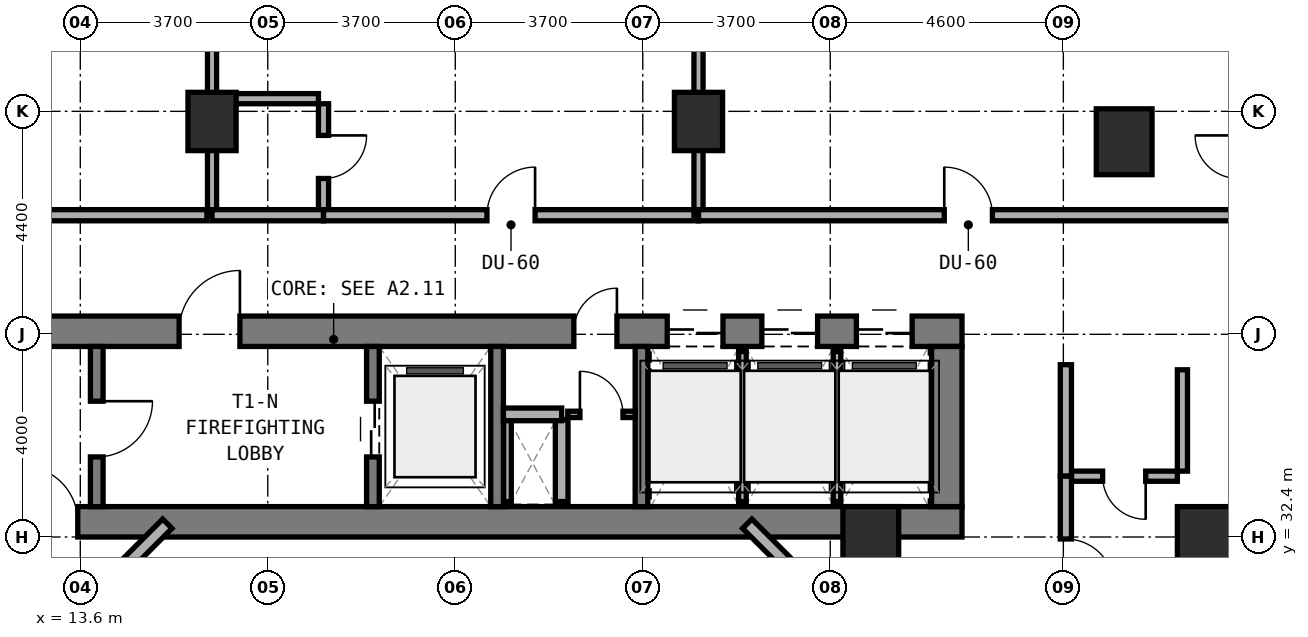
"""IFC4 building model, lengths in metres.
Left out: names, types, materials, properties, quantities, classifications, styles, units other than length and angle.
Written with IfcOpenShell. Run it as: python <this file> out.ifc"""

import sys

from ifc_helpers import new_model, si_unit, direction, frame, frame_2d, origin, origin_2d, place, context, subcontext, project, spatial, rectangle, extrude, element, fill, save


model = new_model("IFC4")
c1 = context("Model", 3, precision=1e-05, world=origin(), true_north=direction((0.0, 1.0)))
c2 = subcontext(c1, "Body", "Model", "MODEL_VIEW")
j1 = project(units=[si_unit("LENGTHUNIT", "METRE"), si_unit("PLANEANGLEUNIT", "RADIAN")], contexts=[c1])
p1 = place(None, origin())
s1 = spatial("IfcSite", under=j1, at=p1, CompositionType="ELEMENT")
p2 = place(p1, origin())
s2 = spatial("IfcBuilding", under=s1, at=p2, CompositionType="ELEMENT")
p3 = place(p2, frame((0.0, 0.0, 38.0)))
s3 = spatial("IfcBuildingStorey", under=s2, at=p3, CompositionType="ELEMENT", Elevation=38.0)
p4 = place(p3, frame((6.2, 32.7, 0.0), z_axis=(0.0, 0.0, 1.0), x_axis=(1.0, 0.0, 0.0)))
e1 = element("IfcWall", 1, at=p4, inside=s3, PredefinedType="SHEAR", context=c2, shape_type="SweptSolid", body=[
    extrude(rectangle(XDim=24.8, YDim=0.6, at=frame_2d((12.4, 0.0))), origin(), (0.0, 0.0, 1.0), 3.5),
])
p5 = place(p4, frame((6.25, 0.0, 0.0)))
e2 = element("IfcOpeningElement", 2, at=p5, cuts=e1, PredefinedType="OPENING", context=c2, shape_type="SweptSolid", body=[
    extrude(rectangle(XDim=1.1, YDim=2.15, at=frame_2d((0.55, 1.075))), frame((0.0, 0.31, 0.0), z_axis=(0.0, -1.0, 0.0), x_axis=(1.0, 0.0, 0.0)), (0.0, 0.0, 1.0), 0.62),
])
p6 = place(p3, frame((6.2, 36.46, 0.0), z_axis=(0.0, 0.0, 1.0), x_axis=(1.0, 0.0, 0.0)))
e3 = element("IfcWall", 3, at=p6, inside=s3, PredefinedType="SHEAR", context=c2, shape_type="SweptSolid", body=[
    extrude(rectangle(XDim=24.8, YDim=0.6, at=frame_2d((12.4, 0.0))), origin(), (0.0, 0.0, 1.0), 3.5),
])
p7 = place(p6, frame((9.35, 0.0, 0.0)))
e4 = element("IfcOpeningElement", 4, at=p7, cuts=e3, PredefinedType="OPENING", context=c2, shape_type="SweptSolid", body=[
    extrude(rectangle(XDim=1.2, YDim=2.15, at=frame_2d((0.6, 1.075))), frame((0.0, 0.31, 0.0), z_axis=(0.0, -1.0, 0.0), x_axis=(1.0, 0.0, 0.0)), (0.0, 0.0, 1.0), 0.62),
])
p8 = place(p6, frame((17.14, 0.0, 0.0)))
e5 = element("IfcOpeningElement", 5, at=p8, cuts=e3, PredefinedType="OPENING", context=c2, shape_type="SweptSolid", body=[
    extrude(rectangle(XDim=0.85, YDim=2.1, at=frame_2d((0.425, 1.05))), frame((0.0, 0.31, 0.0), z_axis=(0.0, -1.0, 0.0), x_axis=(1.0, 0.0, 0.0)), (0.0, 0.0, 1.0), 0.62),
])
p9 = place(p6, frame((18.983, 0.0, 0.0)))
e6 = element("IfcOpeningElement", 6, at=p9, cuts=e3, PredefinedType="OPENING", context=c2, shape_type="SweptSolid", body=[
    extrude(rectangle(XDim=1.1, YDim=2.15, at=frame_2d((0.55, 1.075))), frame((0.0, 0.31, 0.0), z_axis=(0.0, -1.0, 0.0), x_axis=(1.0, 0.0, 0.0)), (0.0, 0.0, 1.0), 0.62),
])
p10 = place(p6, frame((20.85, 0.0, 0.0)))
e7 = element("IfcOpeningElement", 7, at=p10, cuts=e3, PredefinedType="OPENING", context=c2, shape_type="SweptSolid", body=[
    extrude(rectangle(XDim=1.1, YDim=2.15, at=frame_2d((0.55, 1.075))), frame((0.0, 0.31, 0.0), z_axis=(0.0, -1.0, 0.0), x_axis=(1.0, 0.0, 0.0)), (0.0, 0.0, 1.0), 0.62),
])
p11 = place(p6, frame((22.716, 0.0, 0.0)))
e8 = element("IfcOpeningElement", 8, at=p11, cuts=e3, PredefinedType="OPENING", context=c2, shape_type="SweptSolid", body=[
    extrude(rectangle(XDim=1.1, YDim=2.15, at=frame_2d((0.55, 1.075))), frame((0.0, 0.31, 0.0), z_axis=(0.0, -1.0, 0.0), x_axis=(1.0, 0.0, 0.0)), (0.0, 0.0, 1.0), 0.62),
])
p12 = place(p3, frame((30.7, 33.0, 0.0), z_axis=(0.0, 0.0, 1.0), x_axis=(0.0, 1.0, 0.0)))
e9 = element("IfcWall", 9, at=p12, inside=s3, PredefinedType="SHEAR", context=c2, shape_type="SweptSolid", body=[
    extrude(rectangle(XDim=3.16, YDim=0.6, at=frame_2d((1.58, 0.0))), origin(), (0.0, 0.0, 1.0), 3.5),
])
p13 = place(p3, frame((13.925, 33.0, 0.0), z_axis=(0.0, 0.0, 1.0), x_axis=(0.0, 1.0, 0.0)))
e10 = element("IfcWall", 10, at=p13, inside=s3, PredefinedType="STANDARD", context=c2, shape_type="SweptSolid", body=[
    extrude(rectangle(XDim=3.16, YDim=0.25, at=frame_2d((1.58, 0.0))), origin(), (0.0, 0.0, 1.0), 3.22),
])
p14 = place(p13, frame((0.98, 0.0, 0.0)))
e11 = element("IfcOpeningElement", 11, at=p14, cuts=e10, PredefinedType="OPENING", context=c2, shape_type="SweptSolid", body=[
    extrude(rectangle(XDim=1.1, YDim=2.15, at=frame_2d((0.55, 1.075))), frame((0.0, 0.135, 0.0), z_axis=(0.0, -1.0, 0.0), x_axis=(1.0, 0.0, 0.0)), (0.0, 0.0, 1.0), 0.27),
])
p15 = place(p3, frame((19.375, 33.0, 0.0), z_axis=(0.0, 0.0, 1.0), x_axis=(0.0, 1.0, 0.0)))
e12 = element("IfcWall", 12, at=p15, inside=s3, PredefinedType="STANDARD", context=c2, shape_type="SweptSolid", body=[
    extrude(rectangle(XDim=3.16, YDim=0.25, at=frame_2d((1.58, 0.0))), origin(), (0.0, 0.0, 1.0), 3.22),
])
p16 = place(p15, frame((0.98, 0.0, 0.0)))
e13 = element("IfcOpeningElement", 13, at=p16, cuts=e12, PredefinedType="OPENING", context=c2, shape_type="SweptSolid", body=[
    extrude(rectangle(XDim=1.1, YDim=2.15, at=frame_2d((0.55, 1.075))), frame((0.0, 0.135, 0.0), z_axis=(0.0, -1.0, 0.0), x_axis=(1.0, 0.0, 0.0)), (0.0, 0.0, 1.0), 0.27),
])
for number, where, z_axis, x_axis in (
    (14, (21.825, 33.0, 0.0), (0.0, 0.0, 1.0), (0.0, 1.0, 0.0)),
    (15, (24.675, 33.0, 0.0), (0.0, 0.0, 1.0), (0.0, 1.0, 0.0)),
):
    element("IfcWall", number, at=place(p3, frame(where, z_axis=z_axis, x_axis=x_axis)), inside=s3, PredefinedType="STANDARD", context=c2, shape_type="SweptSolid", body=[
        extrude(rectangle(XDim=3.16, YDim=0.25, at=frame_2d((1.58, 0.0))), origin(), (0.0, 0.0, 1.0), 3.22),
    ])
for number, where, z_axis, x_axis in (
    (16, (16.2, 40.6, 0.0), (0.0, 0.0, 1.0), (1.0, 0.0, 0.0)),
    (17, (25.8, 40.6, 0.0), (0.0, 0.0, 1.0), (1.0, 0.0, 0.0)),
):
    element("IfcColumn", number, at=place(p3, frame(where, z_axis=z_axis, x_axis=x_axis)), inside=s3, PredefinedType="COLUMN", context=c2, shape_type="SweptSolid", body=[
        extrude(rectangle(XDim=0.95, YDim=1.15, at=origin_2d()), origin(), (0.0, 0.0, 1.0), 3.5),
    ])
for number, where, z_axis, x_axis in (
    (18, (34.2, 40.2, 0.0), (0.0, 0.0, 1.0), (1.0, 0.0, 0.0)),
    (19, (35.8, 32.35, 0.0), (0.0, 0.0, 1.0), (1.0, 0.0, 0.0)),
    (20, (29.2, 32.35, 0.0), (0.0, 0.0, 1.0), (1.0, 0.0, 0.0)),
):
    element("IfcColumn", number, at=place(p3, frame(where, z_axis=z_axis, x_axis=x_axis)), inside=s3, PredefinedType="COLUMN", context=c2, shape_type="SweptSolid", body=[
        extrude(rectangle(XDim=1.1, YDim=1.3, at=origin_2d()), origin(), (0.0, 0.0, 1.0), 3.5),
    ])
p17 = place(p3, frame((28.596, 30.828, 0.0), z_axis=(0.0, 0.0, 1.0), x_axis=(-0.707059717605, 0.707153841636, 0.0)))
e21 = element("IfcWall", 21, at=p17, inside=s3, PredefinedType="STANDARD", context=c2, shape_type="SweptSolid", body=[
    extrude(rectangle(XDim=2.594, YDim=0.26, at=frame_2d((1.297, 0.0))), origin(), (0.0, 0.0, 1.0), 3.22),
])
p18 = place(p3, frame((15.318, 32.662, 0.0), z_axis=(0.0, 0.0, 1.0), x_axis=(-0.707106781187, -0.707106781187, 0.0)))
e22 = element("IfcWall", 22, at=p18, inside=s3, PredefinedType="STANDARD", context=c2, shape_type="SweptSolid", body=[
    extrude(rectangle(XDim=2.594, YDim=0.26, at=frame_2d((1.297, 0.0))), origin(), (0.0, 0.0, 1.0), 3.22),
])
p19 = place(p3, frame((22.03, 33.1, 0.0), z_axis=(0.0, 0.0, 1.0), x_axis=(0.0, 1.0, 0.0)))
e23 = element("IfcWall", 23, at=p19, inside=s3, PredefinedType="PARTITIONING", context=c2, shape_type="SweptSolid", body=[
    extrude(rectangle(XDim=1.62, YDim=0.15, at=frame_2d((0.81, 0.0))), origin(), (0.0, 0.0, 1.0), 3.22),
])
p20 = place(p3, frame((23.1, 33.1, 0.0), z_axis=(0.0, 0.0, 1.0), x_axis=(0.0, 1.0, 0.0)))
e24 = element("IfcWall", 24, at=p20, inside=s3, PredefinedType="SOLIDWALL", context=c2, shape_type="SweptSolid", body=[
    extrude(rectangle(XDim=1.62, YDim=0.25, at=frame_2d((0.81, 0.0))), origin(), (0.0, 0.0, 1.0), 3.22),
])
p21 = place(p3, frame((21.95, 34.82, 0.0), z_axis=(0.0, 0.0, 1.0), x_axis=(1.0, 0.0, 0.0)))
e25 = element("IfcWall", 25, at=p21, inside=s3, PredefinedType="SOLIDWALL", context=c2, shape_type="SweptSolid", body=[
    extrude(rectangle(XDim=1.15, YDim=0.25, at=frame_2d((0.575, 0.0))), origin(), (0.0, 0.0, 1.0), 3.22),
])
p22 = place(p3, frame((23.22, 34.82, 0.0), z_axis=(0.0, 0.0, 1.0), x_axis=(1.0, 0.0, 0.0)))
e26 = element("IfcWall", 26, at=p22, inside=s3, PredefinedType="PARTITIONING", context=c2, shape_type="SweptSolid", body=[
    extrude(rectangle(XDim=1.33, YDim=0.125, at=frame_2d((0.665, 0.0))), origin(), (0.0, 0.0, 1.0), 3.22),
])
p23 = place(p22, frame((0.24, 0.0, 0.0)))
e27 = element("IfcOpeningElement", 27, at=p23, cuts=e26, PredefinedType="OPENING", context=c2, shape_type="SweptSolid", body=[
    extrude(rectangle(XDim=0.85, YDim=2.1, at=frame_2d((0.425, 1.05))), frame((0.0, 0.073, 0.0), z_axis=(0.0, -1.0, 0.0), x_axis=(1.0, 0.0, 0.0)), (0.0, 0.0, 1.0), 0.145),
])
p24 = place(p3, frame((26.667, 33.1, 0.0), z_axis=(0.0, 0.0, 1.0), x_axis=(0.0, 1.0, 0.0)))
e28 = element("IfcWall", 28, at=p24, inside=s3, PredefinedType="PARTITIONING", context=c2, shape_type="SweptSolid", body=[
    extrude(rectangle(XDim=2.96, YDim=0.15, at=frame_2d((1.48, 0.0))), origin(), (0.0, 0.0, 1.0), 3.22),
])
p25 = place(p3, frame((28.533, 33.1, 0.0), z_axis=(0.0, 0.0, 1.0), x_axis=(0.0, 1.0, 0.0)))
e29 = element("IfcWall", 29, at=p25, inside=s3, PredefinedType="PARTITIONING", context=c2, shape_type="SweptSolid", body=[
    extrude(rectangle(XDim=2.96, YDim=0.15, at=frame_2d((1.48, 0.0))), origin(), (0.0, 0.0, 1.0), 2.395),
])
p26 = place(p3, frame((7.9, 38.75, 0.0), z_axis=(0.0, 0.0, 1.0), x_axis=(1.0, 0.0, 0.0)))
e30 = element("IfcWall", 30, at=p26, inside=s3, PredefinedType="SOLIDWALL", context=c2, shape_type="SweptSolid", body=[
    extrude(rectangle(XDim=8.2, YDim=0.22, at=frame_2d((4.1, 0.0))), origin(), (0.0, 0.0, 1.0), 2.865),
])
p27 = place(p26, frame((3.252, 0.0, 0.0)))
e31 = element("IfcOpeningElement", 31, at=p27, cuts=e30, PredefinedType="OPENING", context=c2, shape_type="SweptSolid", body=[
    extrude(rectangle(XDim=0.95, YDim=2.1, at=frame_2d((0.475, 1.05))), frame((0.0, 0.12, 0.0), z_axis=(0.0, -1.0, 0.0), x_axis=(1.0, 0.0, 0.0)), (0.0, 0.0, 1.0), 0.24),
])
p28 = place(p3, frame((16.2, 38.75, 0.0), z_axis=(0.0, 0.0, 1.0), x_axis=(0.0, 1.0, 0.0)))
e32 = element("IfcWall", 32, at=p28, inside=s3, PredefinedType="SOLIDWALL", context=c2, shape_type="SweptSolid", body=[
    extrude(rectangle(XDim=8.19, YDim=0.18, at=frame_2d((4.095, 0.0))), origin(), (0.0, 0.0, 1.0), 2.395),
])
p29 = place(p3, frame((18.4, 38.85, 0.0), z_axis=(0.0, 0.0, 1.0), x_axis=(0.0, 1.0, 0.0)))
e33 = element("IfcWall", 33, at=p29, inside=s3, PredefinedType="PLUMBINGWALL", context=c2, shape_type="SweptSolid", body=[
    extrude(rectangle(XDim=2.1, YDim=0.2, at=frame_2d((1.05, 0.0))), origin(), (0.0, 0.0, 1.0), 2.745),
])
p30 = place(p29, frame((0.625, 0.0, 0.0)))
e34 = element("IfcOpeningElement", 34, at=p30, cuts=e33, PredefinedType="OPENING", context=c2, shape_type="SweptSolid", body=[
    extrude(rectangle(XDim=0.85, YDim=2.1, at=frame_2d((0.425, 1.05))), frame((0.0, 0.11, 0.0), z_axis=(0.0, -1.0, 0.0), x_axis=(1.0, 0.0, 0.0)), (0.0, 0.0, 1.0), 0.22),
])
p31 = place(p3, frame((16.3, 41.05, 0.0), z_axis=(0.0, 0.0, 1.0), x_axis=(1.0, 0.0, 0.0)))
e35 = element("IfcWall", 35, at=p31, inside=s3, PredefinedType="PLUMBINGWALL", context=c2, shape_type="SweptSolid", body=[
    extrude(rectangle(XDim=2.0, YDim=0.2, at=frame_2d((1.0, 0.0))), origin(), (0.0, 0.0, 1.0), 3.22),
])
p32 = place(p3, frame((16.2, 38.75, 0.0), z_axis=(0.0, 0.0, 1.0), x_axis=(1.0, 0.0, 0.0)))
e36 = element("IfcWall", 36, at=p32, inside=s3, PredefinedType="SOLIDWALL", context=c2, shape_type="SweptSolid", body=[
    extrude(rectangle(XDim=2.2, YDim=0.22, at=frame_2d((1.1, 0.0))), origin(), (0.0, 0.0, 1.0), 2.395),
])
p33 = place(p3, frame((18.4, 38.75, 0.0), z_axis=(0.0, 0.0, 1.0), x_axis=(1.0, 0.0, 0.0)))
e37 = element("IfcWall", 37, at=p33, inside=s3, PredefinedType="SOLIDWALL", context=c2, shape_type="SweptSolid", body=[
    extrude(rectangle(XDim=7.4, YDim=0.22, at=frame_2d((3.7, 0.0))), origin(), (0.0, 0.0, 1.0), 2.395),
])
p34 = place(p33, frame((3.225, 0.0, 0.0)))
e38 = element("IfcOpeningElement", 38, at=p34, cuts=e37, PredefinedType="OPENING", context=c2, shape_type="SweptSolid", body=[
    extrude(rectangle(XDim=0.95, YDim=2.1, at=frame_2d((0.475, 1.05))), frame((0.0, 0.12, 0.0), z_axis=(0.0, -1.0, 0.0), x_axis=(1.0, 0.0, 0.0)), (0.0, 0.0, 1.0), 0.24),
])
p35 = place(p3, frame((25.8, 38.75, 0.0), z_axis=(0.0, 0.0, 1.0), x_axis=(0.0, 1.0, 0.0)))
e39 = element("IfcWall", 39, at=p35, inside=s3, PredefinedType="SOLIDWALL", context=c2, shape_type="SweptSolid", body=[
    extrude(rectangle(XDim=8.19, YDim=0.18, at=frame_2d((4.095, 0.0))), origin(), (0.0, 0.0, 1.0), 2.395),
])
p36 = place(p3, frame((25.8, 38.75, 0.0), z_axis=(0.0, 0.0, 1.0), x_axis=(1.0, 0.0, 0.0)))
e40 = element("IfcWall", 40, at=p36, inside=s3, PredefinedType="SOLIDWALL", context=c2, shape_type="SweptSolid", body=[
    extrude(rectangle(XDim=10.65, YDim=0.22, at=frame_2d((5.325, 0.0))), origin(), (0.0, 0.0, 1.0), 2.395),
])
p37 = place(p36, frame((4.85, 0.0, 0.0)))
e41 = element("IfcOpeningElement", 41, at=p37, cuts=e40, PredefinedType="OPENING", context=c2, shape_type="SweptSolid", body=[
    extrude(rectangle(XDim=0.95, YDim=2.1, at=frame_2d((0.475, 1.05))), frame((0.0, 0.12, 0.0), z_axis=(0.0, -1.0, 0.0), x_axis=(1.0, 0.0, 0.0)), (0.0, 0.0, 1.0), 0.24),
])
p38 = place(p3, frame((33.15, 33.6, 0.0), z_axis=(0.0, 0.0, 1.0), x_axis=(1.0, 0.0, 0.0)))
e42 = element("IfcWall", 42, at=p38, inside=s3, PredefinedType="PLUMBINGWALL", context=c2, shape_type="SweptSolid", body=[
    extrude(rectangle(XDim=2.1, YDim=0.2, at=frame_2d((1.05, 0.0))), origin(), (0.0, 0.0, 1.0), 3.22),
])
p39 = place(p38, frame((0.625, 0.0, 0.0)))
e43 = element("IfcOpeningElement", 43, at=p39, cuts=e42, PredefinedType="OPENING", context=c2, shape_type="SweptSolid", body=[
    extrude(rectangle(XDim=0.85, YDim=2.1, at=frame_2d((0.425, 1.05))), frame((0.0, 0.11, 0.0), z_axis=(0.0, -1.0, 0.0), x_axis=(1.0, 0.0, 0.0)), (0.0, 0.0, 1.0), 0.22),
])
p40 = place(p3, frame((35.35, 33.7, 0.0), z_axis=(0.0, 0.0, 1.0), x_axis=(0.0, 1.0, 0.0)))
e44 = element("IfcWall", 44, at=p40, inside=s3, PredefinedType="PLUMBINGWALL", context=c2, shape_type="SweptSolid", body=[
    extrude(rectangle(XDim=2.0, YDim=0.2, at=frame_2d((1.0, 0.0))), origin(), (0.0, 0.0, 1.0), 2.745),
])
p41 = place(p3, frame((33.05, 33.6, 0.0), z_axis=(0.0, 0.0, 1.0), x_axis=(0.0, 1.0, 0.0)))
e45 = element("IfcWall", 45, at=p41, inside=s3, PredefinedType="SOLIDWALL", context=c2, shape_type="SweptSolid", body=[
    extrude(rectangle(XDim=2.2, YDim=0.22, at=frame_2d((1.1, 0.0))), origin(), (0.0, 0.0, 1.0), 3.22),
])
p42 = place(p3, frame((33.05, 30.172, 0.0), z_axis=(0.0, 0.0, 1.0), x_axis=(0.0, 1.0, 0.0)))
e46 = element("IfcWall", 46, at=p42, inside=s3, PredefinedType="SOLIDWALL", context=c2, shape_type="SweptSolid", body=[
    extrude(rectangle(XDim=3.428, YDim=0.22, at=frame_2d((1.714, 0.0))), origin(), (0.0, 0.0, 1.0), 2.395),
])
p43 = place(p42, frame((1.239, 0.0, 0.0)))
e47 = element("IfcOpeningElement", 47, at=p43, cuts=e46, PredefinedType="OPENING", context=c2, shape_type="SweptSolid", body=[
    extrude(rectangle(XDim=0.95, YDim=2.1, at=frame_2d((0.475, 1.05))), frame((0.0, 0.12, 0.0), z_axis=(0.0, -1.0, 0.0), x_axis=(1.0, 0.0, 0.0)), (0.0, 0.0, 1.0), 0.24),
])
p44 = place(p14, frame((1.1, 0.0, 0.0), z_axis=(0.0, 0.0, 1.0), x_axis=(-1.0, 0.0, 0.0)))
e48 = element("IfcDoor", 48, at=p44, inside=s3, OperationType="SINGLE_SWING_LEFT", PredefinedType="DOOR", context=c2, shape_type="SweptSolid", body=[
    extrude(rectangle(XDim=1.1, YDim=2.15, at=frame_2d((0.55, 1.075))), frame((0.0, 0.025, 0.0), z_axis=(0.0, -1.0, 0.0), x_axis=(1.0, 0.0, 0.0)), (0.0, 0.0, 1.0), 0.05),
])
fill(e11, e48)
p45 = place(p7, origin())
e49 = element("IfcDoor", 49, at=p45, inside=s3, OperationType="SINGLE_SWING_RIGHT", PredefinedType="DOOR", context=c2, shape_type="SweptSolid", body=[
    extrude(rectangle(XDim=1.2, YDim=2.15, at=frame_2d((0.6, 1.075))), frame((0.0, 0.025, 0.0), z_axis=(0.0, -1.0, 0.0), x_axis=(1.0, 0.0, 0.0)), (0.0, 0.0, 1.0), 0.05),
])
fill(e4, e49)
p46 = place(p16, origin())
e50 = element("IfcDoor", 50, at=p46, inside=s3, OperationType="DOUBLE_DOOR_SLIDING", PredefinedType="DOOR", context=c2, shape_type="SweptSolid", body=[
    extrude(rectangle(XDim=1.1, YDim=2.15, at=frame_2d((0.55, 1.075))), frame((0.0, 0.025, 0.0), z_axis=(0.0, -1.0, 0.0), x_axis=(1.0, 0.0, 0.0)), (0.0, 0.0, 1.0), 0.05),
])
fill(e13, e50)
p47 = place(p8, origin())
e51 = element("IfcDoor", 51, at=p47, inside=s3, OperationType="SINGLE_SWING_RIGHT", PredefinedType="DOOR", context=c2, shape_type="SweptSolid", body=[
    extrude(rectangle(XDim=0.85, YDim=2.1, at=frame_2d((0.425, 1.05))), frame((0.0, 0.025, 0.0), z_axis=(0.0, -1.0, 0.0), x_axis=(1.0, 0.0, 0.0)), (0.0, 0.0, 1.0), 0.05),
])
fill(e5, e51)
p48 = place(p9, origin())
e52 = element("IfcDoor", 52, at=p48, inside=s3, OperationType="DOUBLE_DOOR_SLIDING", PredefinedType="DOOR", context=c2, shape_type="SweptSolid", body=[
    extrude(rectangle(XDim=1.1, YDim=2.15, at=frame_2d((0.55, 1.075))), frame((0.0, 0.025, 0.0), z_axis=(0.0, -1.0, 0.0), x_axis=(1.0, 0.0, 0.0)), (0.0, 0.0, 1.0), 0.05),
])
fill(e6, e52)
p49 = place(p10, origin())
e53 = element("IfcDoor", 53, at=p49, inside=s3, OperationType="DOUBLE_DOOR_SLIDING", PredefinedType="DOOR", context=c2, shape_type="SweptSolid", body=[
    extrude(rectangle(XDim=1.1, YDim=2.15, at=frame_2d((0.55, 1.075))), frame((0.0, 0.025, 0.0), z_axis=(0.0, -1.0, 0.0), x_axis=(1.0, 0.0, 0.0)), (0.0, 0.0, 1.0), 0.05),
])
fill(e7, e53)
p50 = place(p11, origin())
e54 = element("IfcDoor", 54, at=p50, inside=s3, OperationType="DOUBLE_DOOR_SLIDING", PredefinedType="DOOR", context=c2, shape_type="SweptSolid", body=[
    extrude(rectangle(XDim=1.1, YDim=2.15, at=frame_2d((0.55, 1.075))), frame((0.0, 0.025, 0.0), z_axis=(0.0, -1.0, 0.0), x_axis=(1.0, 0.0, 0.0)), (0.0, 0.0, 1.0), 0.05),
])
fill(e8, e54)
p51 = place(p5, origin())
e55 = element("IfcDoor", 55, at=p51, inside=s3, OperationType="SINGLE_SWING_LEFT", PredefinedType="DOOR", context=c2, shape_type="SweptSolid", body=[
    extrude(rectangle(XDim=1.1, YDim=2.15, at=frame_2d((0.55, 1.075))), frame((0.0, 0.025, 0.0), z_axis=(0.0, -1.0, 0.0), x_axis=(1.0, 0.0, 0.0)), (0.0, 0.0, 1.0), 0.05),
])
fill(e2, e55)
p52 = place(p23, origin())
e56 = element("IfcDoor", 56, at=p52, inside=s3, OperationType="SINGLE_SWING_LEFT", PredefinedType="DOOR", context=c2, shape_type="SweptSolid", body=[
    extrude(rectangle(XDim=0.85, YDim=2.1, at=frame_2d((0.425, 1.05))), frame((0.0, 0.025, 0.0), z_axis=(0.0, -1.0, 0.0), x_axis=(1.0, 0.0, 0.0)), (0.0, 0.0, 1.0), 0.05),
])
fill(e27, e56)
p53 = place(p30, frame((0.85, 0.0, 0.0), z_axis=(0.0, 0.0, 1.0), x_axis=(-1.0, 0.0, 0.0)))
e57 = element("IfcDoor", 57, at=p53, inside=s3, OperationType="SINGLE_SWING_LEFT", PredefinedType="DOOR", context=c2, shape_type="SweptSolid", body=[
    extrude(rectangle(XDim=0.85, YDim=2.1, at=frame_2d((0.425, 1.05))), frame((0.0, 0.025, 0.0), z_axis=(0.0, -1.0, 0.0), x_axis=(1.0, 0.0, 0.0)), (0.0, 0.0, 1.0), 0.05),
])
fill(e34, e57)
p54 = place(p34, origin())
e58 = element("IfcDoor", 58, at=p54, inside=s3, OperationType="SINGLE_SWING_RIGHT", PredefinedType="DOOR", context=c2, shape_type="SweptSolid", body=[
    extrude(rectangle(XDim=0.95, YDim=2.1, at=frame_2d((0.475, 1.05))), frame((0.0, 0.025, 0.0), z_axis=(0.0, -1.0, 0.0), x_axis=(1.0, 0.0, 0.0)), (0.0, 0.0, 1.0), 0.05),
])
fill(e38, e58)
p55 = place(p37, origin())
e59 = element("IfcDoor", 59, at=p55, inside=s3, OperationType="SINGLE_SWING_LEFT", PredefinedType="DOOR", context=c2, shape_type="SweptSolid", body=[
    extrude(rectangle(XDim=0.95, YDim=2.1, at=frame_2d((0.475, 1.05))), frame((0.0, 0.025, 0.0), z_axis=(0.0, -1.0, 0.0), x_axis=(1.0, 0.0, 0.0)), (0.0, 0.0, 1.0), 0.05),
])
fill(e41, e59)
p56 = place(p39, frame((0.85, 0.0, 0.0), z_axis=(0.0, 0.0, 1.0), x_axis=(-1.0, 0.0, 0.0)))
e60 = element("IfcDoor", 60, at=p56, inside=s3, OperationType="SINGLE_SWING_LEFT", PredefinedType="DOOR", context=c2, shape_type="SweptSolid", body=[
    extrude(rectangle(XDim=0.85, YDim=2.1, at=frame_2d((0.425, 1.05))), frame((0.0, 0.025, 0.0), z_axis=(0.0, -1.0, 0.0), x_axis=(1.0, 0.0, 0.0)), (0.0, 0.0, 1.0), 0.05),
])
fill(e43, e60)
p57 = place(p43, frame((0.95, 0.0, 0.0), z_axis=(0.0, 0.0, 1.0), x_axis=(-1.0, 0.0, 0.0)))
e61 = element("IfcDoor", 61, at=p57, inside=s3, OperationType="SINGLE_SWING_RIGHT", PredefinedType="DOOR", context=c2, shape_type="SweptSolid", body=[
    extrude(rectangle(XDim=0.95, YDim=2.1, at=frame_2d((0.475, 1.05))), frame((0.0, 0.025, 0.0), z_axis=(0.0, -1.0, 0.0), x_axis=(1.0, 0.0, 0.0)), (0.0, 0.0, 1.0), 0.05),
])
fill(e47, e61)
save(model, sys.argv[1])
